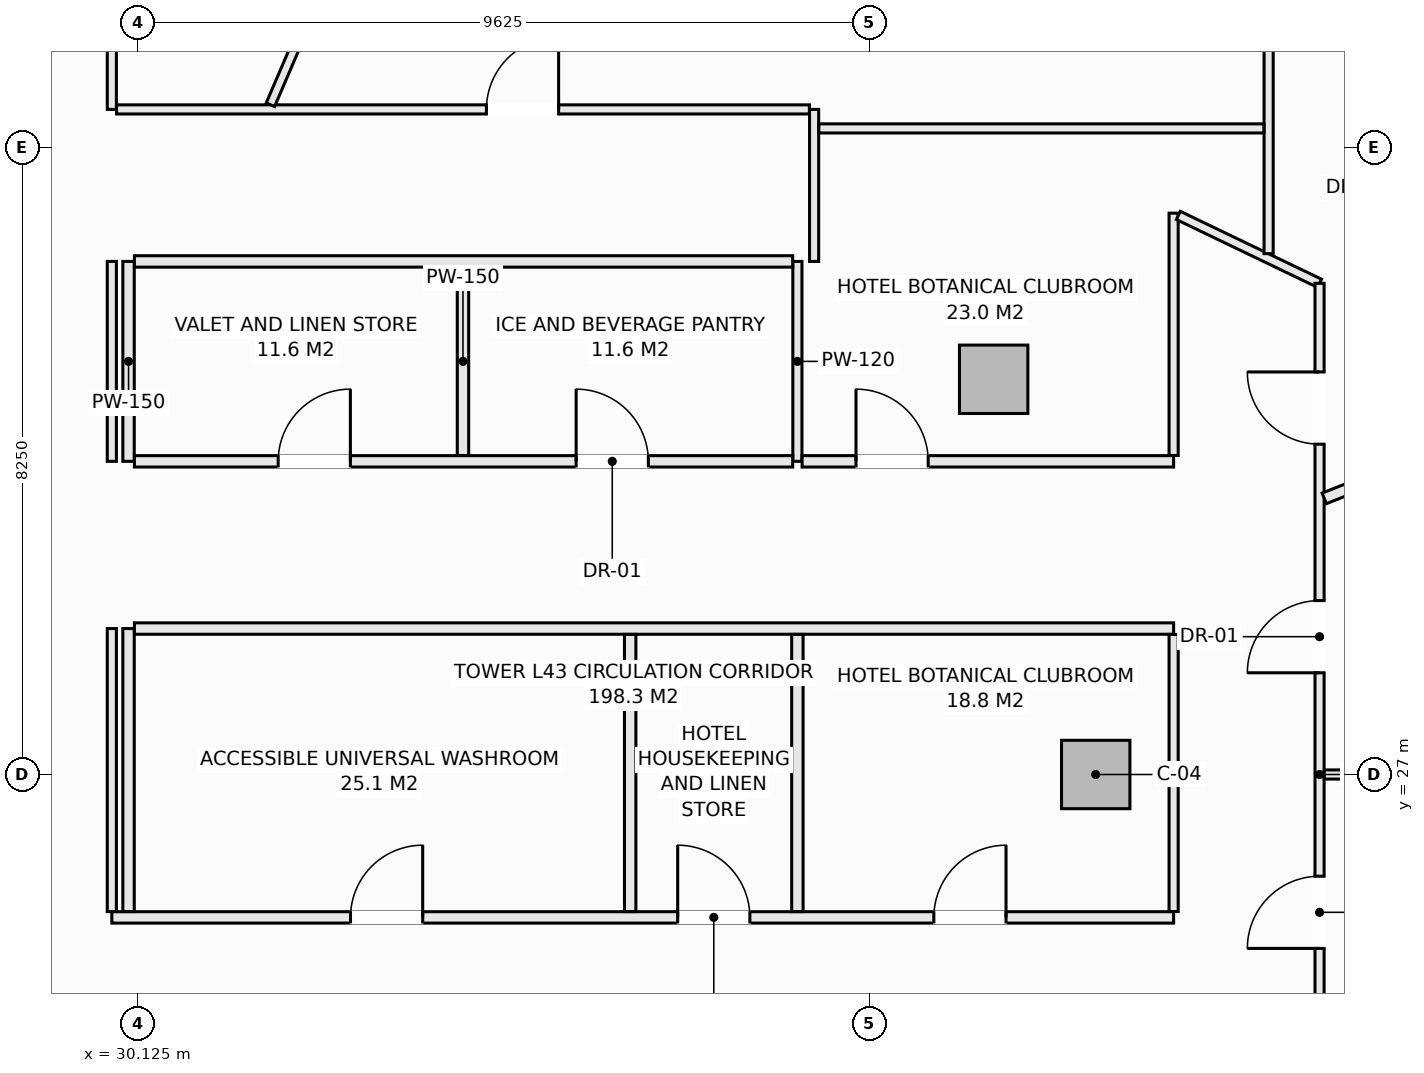
"""IFC4 building model, lengths in metres.
Left out: names, types, materials, properties, quantities, classifications, styles, units other than length and angle.
Written with IfcOpenShell. Run it as: python <this file> out.ifc"""

import sys

from ifc_helpers import new_model, si_unit, direction, frame, frame_2d, origin, origin_2d, place, context, subcontext, project, spatial, rectangle, extrude, element, fill, save


model = new_model("IFC4")
c1 = context("Model", 3, precision=1e-05, world=origin(), true_north=direction((0.0, 1.0)))
c2 = subcontext(c1, "Body", "Model", "MODEL_VIEW")
j1 = project(units=[si_unit("LENGTHUNIT", "METRE"), si_unit("PLANEANGLEUNIT", "RADIAN")], contexts=[c1])
p1 = place(None, origin())
s1 = spatial("IfcSite", under=j1, at=p1, CompositionType="ELEMENT")
p2 = place(p1, origin())
s2 = spatial("IfcBuilding", under=s1, at=p2, CompositionType="ELEMENT")
p3 = place(p2, frame((0.0, 0.0, 166.5)))
s3 = spatial("IfcBuildingStorey", under=s2, at=p3, CompositionType="ELEMENT", Elevation=166.5)
for number, where, z_axis, x_axis in (
    (1, (42.725, 27.0, -0.27), (0.0, 0.0, 1.0), (1.0, 0.0, 0.0)),
    (2, (41.382, 32.199, -0.27), (0.0, 0.0, 1.0), (1.0, 0.0, 0.0)),
):
    element("IfcColumn", number, at=place(p3, frame(where, z_axis=z_axis, x_axis=x_axis)), inside=s3, PredefinedType="COLUMN", context=c2, shape_type="SweptSolid", body=[
        extrude(rectangle(XDim=0.9, YDim=0.9, at=origin_2d()), origin(), (0.0, 0.0, 1.0), 3.4),
    ])
p4 = place(p3, frame((44.313, 38.086, 0.0), z_axis=(0.0, 0.0, 1.0), x_axis=(0.901353070301, -0.433085029363, 0.0)))
e3 = element("IfcWall", 3, at=p4, inside=s3, PredefinedType="SOLIDWALL", context=c2, shape_type="SweptSolid", body=[
    extrude(rectangle(XDim=5.336, YDim=0.3, at=frame_2d((2.668, 0.0))), origin(), (0.0, 0.0, 1.0), 2.653),
])
p5 = place(p4, frame((1.618, 0.0, 0.74)))
e4 = element("IfcOpeningElement", 4, at=p5, cuts=e3, PredefinedType="OPENING", context=c2, shape_type="SweptSolid", body=[
    extrude(rectangle(XDim=2.1, YDim=1.7, at=frame_2d((1.05, 0.85))), frame((0.0, 0.16, 0.0), z_axis=(0.0, -1.0, 0.0), x_axis=(1.0, 0.0, 0.0)), (0.0, 0.0, 1.0), 0.32),
])
p6 = place(p3, frame((29.78, 25.12, 0.0), z_axis=(0.0, 0.0, 1.0), x_axis=(1.0, 0.0, 0.0)))
e5 = element("IfcWall", 5, at=p6, inside=s3, PredefinedType="PARTITIONING", context=c2, shape_type="SweptSolid", body=[
    extrude(rectangle(XDim=13.97, YDim=0.15, at=frame_2d((6.985, 0.0))), origin(), (0.0, 0.0, 1.0), 3.13),
])
p7 = place(p6, frame((3.14, 0.0, 0.0)))
e6 = element("IfcOpeningElement", 6, at=p7, cuts=e5, PredefinedType="OPENING", context=c2, shape_type="SweptSolid", body=[
    extrude(rectangle(XDim=0.95, YDim=2.1, at=frame_2d((0.475, 1.05))), frame((0.0, 0.085, 0.0), z_axis=(0.0, -1.0, 0.0), x_axis=(1.0, 0.0, 0.0)), (0.0, 0.0, 1.0), 0.17),
])
p8 = place(p6, frame((7.445, 0.0, 0.0)))
e7 = element("IfcOpeningElement", 7, at=p8, cuts=e5, PredefinedType="OPENING", context=c2, shape_type="SweptSolid", body=[
    extrude(rectangle(XDim=0.95, YDim=2.1, at=frame_2d((0.475, 1.05))), frame((0.0, 0.085, 0.0), z_axis=(0.0, -1.0, 0.0), x_axis=(1.0, 0.0, 0.0)), (0.0, 0.0, 1.0), 0.17),
])
p9 = place(p6, frame((10.815, 0.0, 0.0)))
e8 = element("IfcOpeningElement", 8, at=p9, cuts=e5, PredefinedType="OPENING", context=c2, shape_type="SweptSolid", body=[
    extrude(rectangle(XDim=0.95, YDim=2.1, at=frame_2d((0.475, 1.05))), frame((0.0, 0.085, 0.0), z_axis=(0.0, -1.0, 0.0), x_axis=(1.0, 0.0, 0.0)), (0.0, 0.0, 1.0), 0.17),
])
p10 = place(p3, frame((30.0, 25.197, 0.0), z_axis=(0.0, 0.0, 1.0), x_axis=(0.0, 1.0, 0.0)))
e9 = element("IfcWall", 9, at=p10, inside=s3, PredefinedType="PARTITIONING", context=c2, shape_type="SweptSolid", body=[
    extrude(rectangle(XDim=3.723, YDim=0.15, at=frame_2d((1.861, 0.0))), origin(), (0.0, 0.0, 1.0), 3.13),
])
p11 = place(p3, frame((30.0, 31.12, 0.0), z_axis=(0.0, 0.0, 1.0), x_axis=(0.0, 1.0, 0.0)))
e10 = element("IfcWall", 10, at=p11, inside=s3, PredefinedType="PARTITIONING", context=c2, shape_type="SweptSolid", body=[
    extrude(rectangle(XDim=2.63, YDim=0.15, at=frame_2d((1.315, 0.0))), origin(), (0.0, 0.0, 1.0), 3.13),
])
p12 = place(p3, frame((30.077, 28.92, 0.0), z_axis=(0.0, 0.0, 1.0), x_axis=(1.0, 0.0, 0.0)))
e11 = element("IfcWall", 11, at=p12, inside=s3, PredefinedType="PARTITIONING", context=c2, shape_type="SweptSolid", body=[
    extrude(rectangle(XDim=13.673, YDim=0.15, at=frame_2d((6.836, 0.0))), origin(), (0.0, 0.0, 1.0), 3.13),
])
for number, where, z_axis, x_axis in (
    (12, (36.6, 25.197, 0.0), (0.0, 0.0, 1.0), (0.0, 1.0, 0.0)),
    (13, (38.8, 25.197, 0.0), (0.0, 0.0, 1.0), (0.0, 1.0, 0.0)),
):
    element("IfcWall", number, at=place(p3, frame(where, z_axis=z_axis, x_axis=x_axis)), inside=s3, PredefinedType="PARTITIONING", context=c2, shape_type="SweptSolid", body=[
        extrude(rectangle(XDim=3.646, YDim=0.15, at=frame_2d((1.823, 0.0))), origin(), (0.0, 0.0, 1.0), 3.13),
    ])
p13 = place(p3, frame((38.8, 31.12, 0.0), z_axis=(0.0, 0.0, 1.0), x_axis=(0.0, 1.0, 0.0)))
e14 = element("IfcWall", 14, at=p13, inside=s3, PredefinedType="PARTITIONING", context=c2, shape_type="SweptSolid", body=[
    extrude(rectangle(XDim=2.63, YDim=0.12, at=frame_2d((1.315, 0.0))), origin(), (0.0, 0.0, 1.0), 3.13),
])
p14 = place(p3, frame((30.077, 31.12, 0.0), z_axis=(0.0, 0.0, 1.0), x_axis=(1.0, 0.0, 0.0)))
e15 = element("IfcWall", 15, at=p14, inside=s3, PredefinedType="PARTITIONING", context=c2, shape_type="SweptSolid", body=[
    extrude(rectangle(XDim=8.661, YDim=0.15, at=frame_2d((4.331, 0.0))), origin(), (0.0, 0.0, 1.0), 3.13),
])
p15 = place(p14, frame((1.892, 0.0, 0.0)))
e16 = element("IfcOpeningElement", 16, at=p15, cuts=e15, PredefinedType="OPENING", context=c2, shape_type="SweptSolid", body=[
    extrude(rectangle(XDim=0.95, YDim=2.1, at=frame_2d((0.475, 1.05))), frame((0.0, 0.085, 0.0), z_axis=(0.0, -1.0, 0.0), x_axis=(1.0, 0.0, 0.0)), (0.0, 0.0, 1.0), 0.17),
])
p16 = place(p14, frame((5.812, 0.0, 0.0)))
e17 = element("IfcOpeningElement", 17, at=p16, cuts=e15, PredefinedType="OPENING", context=c2, shape_type="SweptSolid", body=[
    extrude(rectangle(XDim=0.95, YDim=2.1, at=frame_2d((0.475, 1.05))), frame((0.0, 0.085, 0.0), z_axis=(0.0, -1.0, 0.0), x_axis=(1.0, 0.0, 0.0)), (0.0, 0.0, 1.0), 0.17),
])
p17 = place(p3, frame((38.862, 31.12, 0.0), z_axis=(0.0, 0.0, 1.0), x_axis=(1.0, 0.0, 0.0)))
e18 = element("IfcWall", 18, at=p17, inside=s3, PredefinedType="PARTITIONING", context=c2, shape_type="SweptSolid", body=[
    extrude(rectangle(XDim=4.888, YDim=0.15, at=frame_2d((2.444, 0.0))), origin(), (0.0, 0.0, 1.0), 3.13),
])
p18 = place(p17, frame((0.709, 0.0, 0.0)))
e19 = element("IfcOpeningElement", 19, at=p18, cuts=e18, PredefinedType="OPENING", context=c2, shape_type="SweptSolid", body=[
    extrude(rectangle(XDim=0.95, YDim=2.1, at=frame_2d((0.475, 1.05))), frame((0.0, 0.085, 0.0), z_axis=(0.0, -1.0, 0.0), x_axis=(1.0, 0.0, 0.0)), (0.0, 0.0, 1.0), 0.17),
])
p19 = place(p3, frame((30.077, 33.75, 0.0), z_axis=(0.0, 0.0, 1.0), x_axis=(1.0, 0.0, 0.0)))
e20 = element("IfcWall", 20, at=p19, inside=s3, PredefinedType="PARTITIONING", context=c2, shape_type="SweptSolid", body=[
    extrude(rectangle(XDim=8.661, YDim=0.15, at=frame_2d((4.331, 0.0))), origin(), (0.0, 0.0, 1.0), 3.13),
])
p20 = place(p3, frame((34.4, 31.197, 0.0), z_axis=(0.0, 0.0, 1.0), x_axis=(0.0, 1.0, 0.0)))
e21 = element("IfcWall", 21, at=p20, inside=s3, PredefinedType="PARTITIONING", context=c2, shape_type="SweptSolid", body=[
    extrude(rectangle(XDim=2.476, YDim=0.15, at=frame_2d((1.238, 0.0))), origin(), (0.0, 0.0, 1.0), 3.13),
])
p21 = place(p3, frame((39.02, 33.75, 0.0), z_axis=(0.0, 0.0, 1.0), x_axis=(0.0, 1.0, 0.0)))
e22 = element("IfcWall", 22, at=p21, inside=s3, PredefinedType="PARTITIONING", context=c2, shape_type="SweptSolid", body=[
    extrude(rectangle(XDim=2.0, YDim=0.12, at=frame_2d((1.0, 0.0))), origin(), (0.0, 0.0, 1.0), 3.13),
])
p22 = place(p3, frame((29.78, 25.197, 0.0), z_axis=(0.0, 0.0, 1.0), x_axis=(0.0, 1.0, 0.0)))
e23 = element("IfcWall", 23, at=p22, inside=s3, PredefinedType="PARTITIONING", context=c2, shape_type="SweptSolid", body=[
    extrude(rectangle(XDim=3.723, YDim=0.12, at=frame_2d((1.861, 0.0))), origin(), (0.0, 0.0, 1.0), 3.13),
])
p23 = place(p3, frame((29.78, 31.12, 0.0), z_axis=(0.0, 0.0, 1.0), x_axis=(0.0, 1.0, 0.0)))
e24 = element("IfcWall", 24, at=p23, inside=s3, PredefinedType="PARTITIONING", context=c2, shape_type="SweptSolid", body=[
    extrude(rectangle(XDim=2.63, YDim=0.12, at=frame_2d((1.315, 0.0))), origin(), (0.0, 0.0, 1.0), 3.13),
])
p24 = place(p3, frame((29.78, 35.75, 0.0), z_axis=(0.0, 0.0, 1.0), x_axis=(0.0, 1.0, 0.0)))
e25 = element("IfcWall", 25, at=p24, inside=s3, PredefinedType="PARTITIONING", context=c2, shape_type="SweptSolid", body=[
    extrude(rectangle(XDim=2.688, YDim=0.12, at=frame_2d((1.344, 0.0))), origin(), (0.0, 0.0, 1.0), 3.13),
])
p25 = place(p24, frame((0.869, 0.0, 0.0)))
e26 = element("IfcOpeningElement", 26, at=p25, cuts=e25, PredefinedType="OPENING", context=c2, shape_type="SweptSolid", body=[
    extrude(rectangle(XDim=0.95, YDim=2.1, at=frame_2d((0.475, 1.05))), frame((0.0, 0.07, 0.0), z_axis=(0.0, -1.0, 0.0), x_axis=(1.0, 0.0, 0.0)), (0.0, 0.0, 1.0), 0.14),
])
p26 = place(p3, frame((29.842, 35.75, 0.0), z_axis=(0.0, 0.0, 1.0), x_axis=(1.0, 0.0, 0.0)))
e27 = element("IfcWall", 27, at=p26, inside=s3, PredefinedType="PARTITIONING", context=c2, shape_type="SweptSolid", body=[
    extrude(rectangle(XDim=9.116, YDim=0.12, at=frame_2d((4.558, 0.0))), origin(), (0.0, 0.0, 1.0), 2.505),
])
p27 = place(p26, frame((4.866, 0.0, 0.0)))
e28 = element("IfcOpeningElement", 28, at=p27, cuts=e27, PredefinedType="OPENING", context=c2, shape_type="SweptSolid", body=[
    extrude(rectangle(XDim=0.95, YDim=2.1, at=frame_2d((0.475, 1.05))), frame((0.0, 0.07, 0.0), z_axis=(0.0, -1.0, 0.0), x_axis=(1.0, 0.0, 0.0)), (0.0, 0.0, 1.0), 0.14),
])
p28 = place(p3, frame((43.75, 25.197, 0.0), z_axis=(0.0, 0.0, 1.0), x_axis=(0.0, 1.0, 0.0)))
e29 = element("IfcWall", 29, at=p28, inside=s3, PredefinedType="PARTITIONING", context=c2, shape_type="SweptSolid", body=[
    extrude(rectangle(XDim=3.646, YDim=0.12, at=frame_2d((1.823, 0.0))), origin(), (0.0, 0.0, 1.0), 3.13),
])
p29 = place(p3, frame((43.75, 31.197, 0.0), z_axis=(0.0, 0.0, 1.0), x_axis=(0.0, 1.0, 0.0)))
e30 = element("IfcWall", 30, at=p29, inside=s3, PredefinedType="PARTITIONING", context=c2, shape_type="SweptSolid", body=[
    extrude(rectangle(XDim=3.188, YDim=0.12, at=frame_2d((1.594, 0.0))), origin(), (0.0, 0.0, 1.0), 3.13),
])
p30 = place(p3, frame((43.812, 34.355, 0.0), z_axis=(0.0, 0.0, 1.0), x_axis=(0.901236415331, -0.433327732417, 0.0)))
e31 = element("IfcWall", 31, at=p30, inside=s3, PredefinedType="PARTITIONING", context=c2, shape_type="SweptSolid", body=[
    extrude(rectangle(XDim=2.062, YDim=0.12, at=frame_2d((1.031, 0.0))), origin(), (0.0, 0.0, 1.0), 3.13),
])
p31 = place(p3, frame((45.67, 20.538, 0.0), z_axis=(0.0, 0.0, 1.0), x_axis=(0.0, 1.0, 0.0)))
e32 = element("IfcWall", 32, at=p31, inside=s3, PredefinedType="PARTITIONING", context=c2, shape_type="SweptSolid", body=[
    extrude(rectangle(XDim=12.924, YDim=0.12, at=frame_2d((6.462, 0.0))), origin(), (0.0, 0.0, 1.0), 3.13),
])
p32 = place(p31, frame((1.166, 0.0, 0.0)))
e33 = element("IfcOpeningElement", 33, at=p32, cuts=e32, PredefinedType="OPENING", context=c2, shape_type="SweptSolid", body=[
    extrude(rectangle(XDim=0.95, YDim=2.1, at=frame_2d((0.475, 1.05))), frame((0.0, 0.07, 0.0), z_axis=(0.0, -1.0, 0.0), x_axis=(1.0, 0.0, 0.0)), (0.0, 0.0, 1.0), 0.14),
])
p33 = place(p31, frame((4.174, 0.0, 0.0)))
e34 = element("IfcOpeningElement", 34, at=p33, cuts=e32, PredefinedType="OPENING", context=c2, shape_type="SweptSolid", body=[
    extrude(rectangle(XDim=0.95, YDim=2.1, at=frame_2d((0.475, 1.05))), frame((0.0, 0.07, 0.0), z_axis=(0.0, -1.0, 0.0), x_axis=(1.0, 0.0, 0.0)), (0.0, 0.0, 1.0), 0.14),
])
p34 = place(p31, frame((7.8, 0.0, 0.0)))
e35 = element("IfcOpeningElement", 35, at=p34, cuts=e32, PredefinedType="OPENING", context=c2, shape_type="SweptSolid", body=[
    extrude(rectangle(XDim=0.95, YDim=2.1, at=frame_2d((0.475, 1.05))), frame((0.0, 0.07, 0.0), z_axis=(0.0, -1.0, 0.0), x_axis=(1.0, 0.0, 0.0)), (0.0, 0.0, 1.0), 0.14),
])
p35 = place(p31, frame((10.808, 0.0, 0.0)))
e36 = element("IfcOpeningElement", 36, at=p35, cuts=e32, PredefinedType="OPENING", context=c2, shape_type="SweptSolid", body=[
    extrude(rectangle(XDim=0.95, YDim=2.1, at=frame_2d((0.475, 1.05))), frame((0.0, 0.07, 0.0), z_axis=(0.0, -1.0, 0.0), x_axis=(1.0, 0.0, 0.0)), (0.0, 0.0, 1.0), 0.14),
])
p36 = place(p3, frame((45.732, 27.0, 0.0), z_axis=(0.0, 0.0, 1.0), x_axis=(1.0, 0.0, 0.0)))
e37 = element("IfcWall", 37, at=p36, inside=s3, PredefinedType="PARTITIONING", context=c2, shape_type="SweptSolid", body=[
    extrude(rectangle(XDim=6.177, YDim=0.12, at=frame_2d((3.088, 0.0))), origin(), (0.0, 0.0, 1.0), 2.505),
])
p37 = place(p3, frame((45.0, 33.853, 0.0), z_axis=(0.0, 0.0, 1.0), x_axis=(0.0, 1.0, 0.0)))
e38 = element("IfcWall", 38, at=p37, inside=s3, PredefinedType="PARTITIONING", context=c2, shape_type="SweptSolid", body=[
    extrude(rectangle(XDim=3.735, YDim=0.12, at=frame_2d((1.867, 0.0))), origin(), (0.0, 0.0, 1.0), 3.13),
])
p38 = place(p3, frame((45.732, 30.633, 0.0), z_axis=(0.0, 0.0, 1.0), x_axis=(0.929706134606, 0.368302190158, 0.0)))
e39 = element("IfcWall", 39, at=p38, inside=s3, PredefinedType="PARTITIONING", context=c2, shape_type="SweptSolid", body=[
    extrude(rectangle(XDim=5.251, YDim=0.15, at=frame_2d((2.625, 0.0))), origin(), (0.0, 0.0, 1.0), 3.13),
])
p39 = place(p3, frame((39.082, 35.5, 0.0), z_axis=(0.0, 0.0, 1.0), x_axis=(1.0, 0.0, 0.0)))
e40 = element("IfcWall", 40, at=p39, inside=s3, PredefinedType="PARTITIONING", context=c2, shape_type="SweptSolid", body=[
    extrude(rectangle(XDim=5.856, YDim=0.12, at=frame_2d((2.928, 0.0))), origin(), (0.0, 0.0, 1.0), 2.812),
])
p40 = place(p3, frame((31.867, 35.812, 0.0), z_axis=(0.0, 0.0, 1.0), x_axis=(0.394572646642, 0.918864748765, 0.0)))
e41 = element("IfcWall", 41, at=p40, inside=s3, PredefinedType="PARTITIONING", context=c2, shape_type="SweptSolid", body=[
    extrude(rectangle(XDim=8.748, YDim=0.12, at=frame_2d((4.374, 0.0))), origin(), (0.0, 0.0, 1.0), 3.13),
])
p41 = place(p5, origin())
e42 = element("IfcWindow", 42, at=p41, inside=s3, PartitioningType="SINGLE_PANEL", PredefinedType="WINDOW", context=c2, shape_type="SweptSolid", body=[
    extrude(rectangle(XDim=2.1, YDim=1.7, at=frame_2d((1.05, 0.85))), frame((0.0, 0.03, 0.0), z_axis=(0.0, -1.0, 0.0), x_axis=(1.0, 0.0, 0.0)), (0.0, 0.0, 1.0), 0.06),
])
fill(e4, e42)
p42 = place(p7, origin())
e43 = element("IfcDoor", 43, at=p42, inside=s3, OperationType="SINGLE_SWING_RIGHT", PredefinedType="DOOR", context=c2, shape_type="SweptSolid", body=[
    extrude(rectangle(XDim=0.95, YDim=2.1, at=frame_2d((0.475, 1.05))), frame((0.0, 0.025, 0.0), z_axis=(0.0, -1.0, 0.0), x_axis=(1.0, 0.0, 0.0)), (0.0, 0.0, 1.0), 0.05),
])
fill(e6, e43)
p43 = place(p8, origin())
e44 = element("IfcDoor", 44, at=p43, inside=s3, OperationType="SINGLE_SWING_LEFT", PredefinedType="DOOR", context=c2, shape_type="SweptSolid", body=[
    extrude(rectangle(XDim=0.95, YDim=2.1, at=frame_2d((0.475, 1.05))), frame((0.0, 0.025, 0.0), z_axis=(0.0, -1.0, 0.0), x_axis=(1.0, 0.0, 0.0)), (0.0, 0.0, 1.0), 0.05),
])
fill(e7, e44)
p44 = place(p15, origin())
e45 = element("IfcDoor", 45, at=p44, inside=s3, OperationType="SINGLE_SWING_RIGHT", PredefinedType="DOOR", context=c2, shape_type="SweptSolid", body=[
    extrude(rectangle(XDim=0.95, YDim=2.1, at=frame_2d((0.475, 1.05))), frame((0.0, 0.025, 0.0), z_axis=(0.0, -1.0, 0.0), x_axis=(1.0, 0.0, 0.0)), (0.0, 0.0, 1.0), 0.05),
])
fill(e16, e45)
p45 = place(p16, origin())
e46 = element("IfcDoor", 46, at=p45, inside=s3, OperationType="SINGLE_SWING_LEFT", PredefinedType="DOOR", context=c2, shape_type="SweptSolid", body=[
    extrude(rectangle(XDim=0.95, YDim=2.1, at=frame_2d((0.475, 1.05))), frame((0.0, 0.025, 0.0), z_axis=(0.0, -1.0, 0.0), x_axis=(1.0, 0.0, 0.0)), (0.0, 0.0, 1.0), 0.05),
])
fill(e17, e46)
p46 = place(p33, origin())
e47 = element("IfcDoor", 47, at=p46, inside=s3, OperationType="SINGLE_SWING_LEFT", PredefinedType="DOOR", context=c2, shape_type="SweptSolid", body=[
    extrude(rectangle(XDim=0.95, YDim=2.1, at=frame_2d((0.475, 1.05))), frame((0.0, 0.025, 0.0), z_axis=(0.0, -1.0, 0.0), x_axis=(1.0, 0.0, 0.0)), (0.0, 0.0, 1.0), 0.05),
])
fill(e34, e47)
p47 = place(p9, origin())
e48 = element("IfcDoor", 48, at=p47, inside=s3, OperationType="SINGLE_SWING_RIGHT", PredefinedType="DOOR", context=c2, shape_type="SweptSolid", body=[
    extrude(rectangle(XDim=0.95, YDim=2.1, at=frame_2d((0.475, 1.05))), frame((0.0, 0.025, 0.0), z_axis=(0.0, -1.0, 0.0), x_axis=(1.0, 0.0, 0.0)), (0.0, 0.0, 1.0), 0.05),
])
fill(e8, e48)
p48 = place(p34, origin())
e49 = element("IfcDoor", 49, at=p48, inside=s3, OperationType="SINGLE_SWING_LEFT", PredefinedType="DOOR", context=c2, shape_type="SweptSolid", body=[
    extrude(rectangle(XDim=0.95, YDim=2.1, at=frame_2d((0.475, 1.05))), frame((0.0, 0.025, 0.0), z_axis=(0.0, -1.0, 0.0), x_axis=(1.0, 0.0, 0.0)), (0.0, 0.0, 1.0), 0.05),
])
fill(e35, e49)
p49 = place(p35, origin())
e50 = element("IfcDoor", 50, at=p49, inside=s3, OperationType="SINGLE_SWING_RIGHT", PredefinedType="DOOR", context=c2, shape_type="SweptSolid", body=[
    extrude(rectangle(XDim=0.95, YDim=2.1, at=frame_2d((0.475, 1.05))), frame((0.0, 0.025, 0.0), z_axis=(0.0, -1.0, 0.0), x_axis=(1.0, 0.0, 0.0)), (0.0, 0.0, 1.0), 0.05),
])
fill(e36, e50)
p50 = place(p18, origin())
e51 = element("IfcDoor", 51, at=p50, inside=s3, OperationType="SINGLE_SWING_LEFT", PredefinedType="DOOR", context=c2, shape_type="SweptSolid", body=[
    extrude(rectangle(XDim=0.95, YDim=2.1, at=frame_2d((0.475, 1.05))), frame((0.0, 0.025, 0.0), z_axis=(0.0, -1.0, 0.0), x_axis=(1.0, 0.0, 0.0)), (0.0, 0.0, 1.0), 0.05),
])
fill(e19, e51)
p51 = place(p27, origin())
e52 = element("IfcDoor", 52, at=p51, inside=s3, OperationType="SINGLE_SWING_RIGHT", PredefinedType="DOOR", context=c2, shape_type="SweptSolid", body=[
    extrude(rectangle(XDim=0.95, YDim=2.1, at=frame_2d((0.475, 1.05))), frame((0.0, 0.025, 0.0), z_axis=(0.0, -1.0, 0.0), x_axis=(1.0, 0.0, 0.0)), (0.0, 0.0, 1.0), 0.05),
])
fill(e28, e52)
save(model, sys.argv[1])
